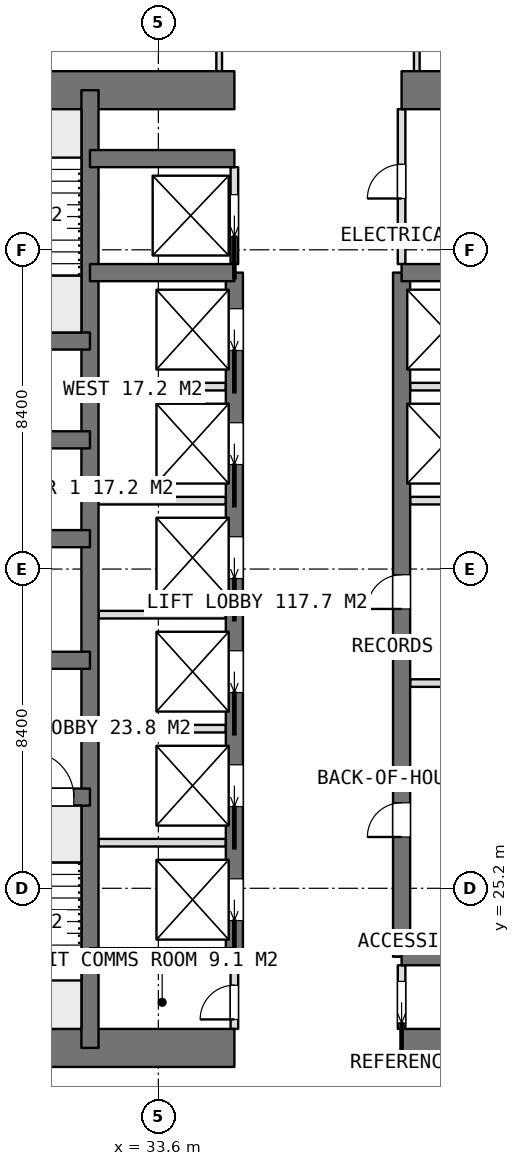
"""IFC4 building model, lengths in metres.
Left out: names, types, materials, properties, quantities, classifications, styles, units other than length and angle.
Written with IfcOpenShell. Run it as: python <this file> out.ifc"""

import sys

from ifc_helpers import new_model, si_unit, direction, frame, frame_2d, origin, place, context, subcontext, project, spatial, rectangle, extrude, element, fill, save


model = new_model("IFC4")
c1 = context("Model", 3, precision=1e-05, world=origin(), true_north=direction((0.0, 1.0)))
c2 = subcontext(c1, "Body", "Model", "MODEL_VIEW")
j1 = project(units=[si_unit("LENGTHUNIT", "METRE"), si_unit("PLANEANGLEUNIT", "RADIAN")], contexts=[c1])
p1 = place(None, origin())
s1 = spatial("IfcSite", under=j1, at=p1, CompositionType="ELEMENT")
p2 = place(p1, origin())
s2 = spatial("IfcBuilding", under=s1, at=p2, CompositionType="ELEMENT")
p3 = place(p2, frame((0.0, 0.0, 206.45)))
s3 = spatial("IfcBuildingStorey", under=s2, at=p3, CompositionType="ELEMENT", Elevation=206.45)
p4 = place(p3, frame((25.2, 21.0, 0.0), z_axis=(0.0, 0.0, 1.0), x_axis=(1.0, 0.0, 0.0)))
e1 = element("IfcWall", 1, at=p4, inside=s3, PredefinedType="SHEAR", context=c2, shape_type="SweptSolid", body=[
    extrude(rectangle(XDim=10.4, YDim=1.0, at=frame_2d((5.2, 0.0))), origin(), (0.0, 0.0, 1.0), 3.75),
])
p5 = place(p3, frame((40.0, 21.0, 0.0), z_axis=(0.0, 0.0, 1.0), x_axis=(1.0, 0.0, 0.0)))
e2 = element("IfcWall", 2, at=p5, inside=s3, PredefinedType="SHEAR", context=c2, shape_type="SweptSolid", body=[
    extrude(rectangle(XDim=10.4, YDim=1.0, at=frame_2d((5.2, 0.0))), origin(), (0.0, 0.0, 1.0), 3.75),
])
p6 = place(p3, frame((25.2, 46.2, 0.0), z_axis=(0.0, 0.0, 1.0), x_axis=(1.0, 0.0, 0.0)))
e3 = element("IfcWall", 3, at=p6, inside=s3, PredefinedType="SHEAR", context=c2, shape_type="SweptSolid", body=[
    extrude(rectangle(XDim=10.4, YDim=1.0, at=frame_2d((5.2, 0.0))), origin(), (0.0, 0.0, 1.0), 3.75),
])
p7 = place(p3, frame((40.0, 46.2, 0.0), z_axis=(0.0, 0.0, 1.0), x_axis=(1.0, 0.0, 0.0)))
e4 = element("IfcWall", 4, at=p7, inside=s3, PredefinedType="SHEAR", context=c2, shape_type="SweptSolid", body=[
    extrude(rectangle(XDim=10.4, YDim=1.0, at=frame_2d((5.2, 0.0))), origin(), (0.0, 0.0, 1.0), 3.75),
])
p8 = place(p3, frame((31.8, 21.0, 0.0), z_axis=(0.0, 0.0, 1.0), x_axis=(0.0, 1.0, 0.0)))
e5 = element("IfcWall", 5, at=p8, inside=s3, PredefinedType="SHEAR", context=c2, shape_type="SweptSolid", body=[
    extrude(rectangle(XDim=25.2, YDim=0.45, at=frame_2d((12.6, 0.0))), origin(), (0.0, 0.0, 1.0), 3.75),
])
p9 = place(p3, frame((35.6, 23.4, 0.0), z_axis=(0.0, 0.0, 1.0), x_axis=(0.0, 1.0, 0.0)))
e6 = element("IfcWall", 6, at=p9, inside=s3, PredefinedType="SHEAR", context=c2, shape_type="SweptSolid", body=[
    extrude(rectangle(XDim=18.0, YDim=0.45, at=frame_2d((9.0, 0.0))), origin(), (0.0, 0.0, 1.0), 3.75),
])
p10 = place(p9, frame((0.95, 0.0, 0.0)))
e7 = element("IfcOpeningElement", 7, at=p10, cuts=e6, PredefinedType="OPENING", context=c2, shape_type="SweptSolid", body=[
    extrude(rectangle(XDim=1.1, YDim=2.1, at=frame_2d((0.55, 1.05))), frame((0.0, 0.235, 0.0), z_axis=(0.0, -1.0, 0.0), x_axis=(1.0, 0.0, 0.0)), (0.0, 0.0, 1.0), 0.47),
])
p11 = place(p9, frame((3.95, 0.0, 0.0)))
e8 = element("IfcOpeningElement", 8, at=p11, cuts=e6, PredefinedType="OPENING", context=c2, shape_type="SweptSolid", body=[
    extrude(rectangle(XDim=1.1, YDim=2.1, at=frame_2d((0.55, 1.05))), frame((0.0, 0.235, 0.0), z_axis=(0.0, -1.0, 0.0), x_axis=(1.0, 0.0, 0.0)), (0.0, 0.0, 1.0), 0.47),
])
p12 = place(p9, frame((6.95, 0.0, 0.0)))
e9 = element("IfcOpeningElement", 9, at=p12, cuts=e6, PredefinedType="OPENING", context=c2, shape_type="SweptSolid", body=[
    extrude(rectangle(XDim=1.1, YDim=2.1, at=frame_2d((0.55, 1.05))), frame((0.0, 0.235, 0.0), z_axis=(0.0, -1.0, 0.0), x_axis=(1.0, 0.0, 0.0)), (0.0, 0.0, 1.0), 0.47),
])
p13 = place(p9, frame((9.95, 0.0, 0.0)))
e10 = element("IfcOpeningElement", 10, at=p13, cuts=e6, PredefinedType="OPENING", context=c2, shape_type="SweptSolid", body=[
    extrude(rectangle(XDim=1.1, YDim=2.1, at=frame_2d((0.55, 1.05))), frame((0.0, 0.235, 0.0), z_axis=(0.0, -1.0, 0.0), x_axis=(1.0, 0.0, 0.0)), (0.0, 0.0, 1.0), 0.47),
])
p14 = place(p9, frame((12.95, 0.0, 0.0)))
e11 = element("IfcOpeningElement", 11, at=p14, cuts=e6, PredefinedType="OPENING", context=c2, shape_type="SweptSolid", body=[
    extrude(rectangle(XDim=1.1, YDim=2.1, at=frame_2d((0.55, 1.05))), frame((0.0, 0.235, 0.0), z_axis=(0.0, -1.0, 0.0), x_axis=(1.0, 0.0, 0.0)), (0.0, 0.0, 1.0), 0.47),
])
p15 = place(p9, frame((15.95, 0.0, 0.0)))
e12 = element("IfcOpeningElement", 12, at=p15, cuts=e6, PredefinedType="OPENING", context=c2, shape_type="SweptSolid", body=[
    extrude(rectangle(XDim=1.1, YDim=2.1, at=frame_2d((0.55, 1.05))), frame((0.0, 0.235, 0.0), z_axis=(0.0, -1.0, 0.0), x_axis=(1.0, 0.0, 0.0)), (0.0, 0.0, 1.0), 0.47),
])
p16 = place(p3, frame((40.0, 23.4, 0.0), z_axis=(0.0, 0.0, 1.0), x_axis=(0.0, 1.0, 0.0)))
e13 = element("IfcWall", 13, at=p16, inside=s3, PredefinedType="SHEAR", context=c2, shape_type="SweptSolid", body=[
    extrude(rectangle(XDim=18.0, YDim=0.45, at=frame_2d((9.0, 0.0))), origin(), (0.0, 0.0, 1.0), 3.75),
])
p17 = place(p16, frame((3.15, 0.0, 0.0)))
e14 = element("IfcOpeningElement", 14, at=p17, cuts=e13, PredefinedType="OPENING", context=c2, shape_type="SweptSolid", body=[
    extrude(rectangle(XDim=0.9, YDim=2.1, at=frame_2d((0.45, 1.05))), frame((0.0, 0.235, 0.0), z_axis=(0.0, -1.0, 0.0), x_axis=(1.0, 0.0, 0.0)), (0.0, 0.0, 1.0), 0.47),
])
p18 = place(p16, frame((9.15, 0.0, 0.0)))
e15 = element("IfcOpeningElement", 15, at=p18, cuts=e13, PredefinedType="OPENING", context=c2, shape_type="SweptSolid", body=[
    extrude(rectangle(XDim=0.9, YDim=2.1, at=frame_2d((0.45, 1.05))), frame((0.0, 0.235, 0.0), z_axis=(0.0, -1.0, 0.0), x_axis=(1.0, 0.0, 0.0)), (0.0, 0.0, 1.0), 0.47),
])
for number, where, z_axis, x_axis in (
    (16, (31.8, 23.4, 0.0), (0.0, 0.0, 1.0), (1.0, 0.0, 0.0)),
    (17, (31.8, 41.4, 0.0), (0.0, 0.0, 1.0), (1.0, 0.0, 0.0)),
    (18, (31.8, 44.4, 0.0), (0.0, 0.0, 1.0), (1.0, 0.0, 0.0)),
    (19, (40.0, 23.4, 0.0), (0.0, 0.0, 1.0), (1.0, 0.0, 0.0)),
    (20, (40.0, 41.4, 0.0), (0.0, 0.0, 1.0), (1.0, 0.0, 0.0)),
):
    element("IfcWall", number, at=place(p3, frame(where, z_axis=z_axis, x_axis=x_axis)), inside=s3, PredefinedType="SHEAR", context=c2, shape_type="SweptSolid", body=[
        extrude(rectangle(XDim=3.8, YDim=0.45, at=frame_2d((1.9, 0.0))), origin(), (0.0, 0.0, 1.0), 3.75),
    ])
p19 = place(p3, frame((25.2, 27.6, 0.0), z_axis=(0.0, 0.0, 1.0), x_axis=(1.0, 0.0, 0.0)))
e21 = element("IfcWall", 21, at=p19, inside=s3, PredefinedType="SHEAR", context=c2, shape_type="SweptSolid", body=[
    extrude(rectangle(XDim=6.6, YDim=0.45, at=frame_2d((3.3, 0.0))), origin(), (0.0, 0.0, 1.0), 3.75),
])
p20 = place(p19, frame((4.975, 0.0, 0.0)))
e22 = element("IfcOpeningElement", 22, at=p20, cuts=e21, PredefinedType="OPENING", context=c2, shape_type="SweptSolid", body=[
    extrude(rectangle(XDim=1.2, YDim=2.1, at=frame_2d((0.6, 1.05))), frame((0.0, 0.235, 0.0), z_axis=(0.0, -1.0, 0.0), x_axis=(1.0, 0.0, 0.0)), (0.0, 0.0, 1.0), 0.47),
])
p21 = place(p3, frame((25.2, 31.2, 0.0), z_axis=(0.0, 0.0, 1.0), x_axis=(1.0, 0.0, 0.0)))
e23 = element("IfcWall", 23, at=p21, inside=s3, PredefinedType="SHEAR", context=c2, shape_type="SweptSolid", body=[
    extrude(rectangle(XDim=6.6, YDim=0.45, at=frame_2d((3.3, 0.0))), origin(), (0.0, 0.0, 1.0), 3.75),
])
p22 = place(p21, frame((2.65, 0.0, 0.0)))
e24 = element("IfcOpeningElement", 24, at=p22, cuts=e23, PredefinedType="OPENING", context=c2, shape_type="SweptSolid", body=[
    extrude(rectangle(XDim=1.3, YDim=2.1, at=frame_2d((0.65, 1.05))), frame((0.0, 0.235, 0.0), z_axis=(0.0, -1.0, 0.0), x_axis=(1.0, 0.0, 0.0)), (0.0, 0.0, 1.0), 0.47),
])
for number, where, z_axis, x_axis in (
    (25, (25.2, 34.4, 0.0), (0.0, 0.0, 1.0), (1.0, 0.0, 0.0)),
    (26, (25.2, 37.0, 0.0), (0.0, 0.0, 1.0), (1.0, 0.0, 0.0)),
    (27, (25.2, 39.6, 0.0), (0.0, 0.0, 1.0), (1.0, 0.0, 0.0)),
):
    element("IfcWall", number, at=place(p3, frame(where, z_axis=z_axis, x_axis=x_axis)), inside=s3, PredefinedType="SHEAR", context=c2, shape_type="SweptSolid", body=[
        extrude(rectangle(XDim=6.6, YDim=0.45, at=frame_2d((3.3, 0.0))), origin(), (0.0, 0.0, 1.0), 3.75),
    ])
for number, where, z_axis, x_axis in (
    (28, (32.025, 26.4, 0.0), (0.0, 0.0, 1.0), (1.0, 0.0, 0.0)),
    (29, (32.025, 29.4, 0.0), (0.0, 0.0, 1.0), (1.0, 0.0, 0.0)),
    (30, (32.025, 32.4, 0.0), (0.0, 0.0, 1.0), (1.0, 0.0, 0.0)),
    (31, (32.025, 35.4, 0.0), (0.0, 0.0, 1.0), (1.0, 0.0, 0.0)),
    (32, (32.025, 38.4, 0.0), (0.0, 0.0, 1.0), (1.0, 0.0, 0.0)),
):
    element("IfcWall", number, at=place(p3, frame(where, z_axis=z_axis, x_axis=x_axis)), inside=s3, PredefinedType="PARTITIONING", context=c2, shape_type="SweptSolid", body=[
        extrude(rectangle(XDim=3.35, YDim=0.2, at=frame_2d((1.675, 0.0))), origin(), (0.0, 0.0, 1.0), 3.5),
    ])
for number, where, z_axis, x_axis in (
    (33, (40.225, 35.4, 0.0), (0.0, 0.0, 1.0), (1.0, 0.0, 0.0)),
    (34, (40.225, 38.4, 0.0), (0.0, 0.0, 1.0), (1.0, 0.0, 0.0)),
):
    element("IfcWall", number, at=place(p3, frame(where, z_axis=z_axis, x_axis=x_axis)), inside=s3, PredefinedType="PARTITIONING", context=c2, shape_type="SweptSolid", body=[
        extrude(rectangle(XDim=3.35, YDim=0.2, at=frame_2d((1.675, 0.0))), origin(), (0.0, 0.0, 1.0), 3.5),
    ])
p23 = place(p3, frame((40.0, 21.5, 0.0), z_axis=(0.0, 0.0, 1.0), x_axis=(0.0, 1.0, 0.0)))
e35 = element("IfcWall", 35, at=p23, inside=s3, PredefinedType="PARTITIONING", context=c2, shape_type="SweptSolid", body=[
    extrude(rectangle(XDim=1.675, YDim=0.2, at=frame_2d((0.837, 0.0))), origin(), (0.0, 0.0, 1.0), 3.5),
])
p24 = place(p23, frame((0.15, 0.0, 0.0)))
e36 = element("IfcOpeningElement", 36, at=p24, cuts=e35, PredefinedType="OPENING", context=c2, shape_type="SweptSolid", body=[
    extrude(rectangle(XDim=1.1, YDim=2.1, at=frame_2d((0.55, 1.05))), frame((0.0, 0.11, 0.0), z_axis=(0.0, -1.0, 0.0), x_axis=(1.0, 0.0, 0.0)), (0.0, 0.0, 1.0), 0.22),
])
p25 = place(p3, frame((40.0, 41.625, 0.0), z_axis=(0.0, 0.0, 1.0), x_axis=(0.0, 1.0, 0.0)))
e37 = element("IfcWall", 37, at=p25, inside=s3, PredefinedType="PARTITIONING", context=c2, shape_type="SweptSolid", body=[
    extrude(rectangle(XDim=4.075, YDim=0.2, at=frame_2d((2.038, 0.0))), origin(), (0.0, 0.0, 1.0), 3.5),
])
p26 = place(p25, frame((1.725, 0.0, 0.0)))
e38 = element("IfcOpeningElement", 38, at=p26, cuts=e37, PredefinedType="OPENING", context=c2, shape_type="SweptSolid", body=[
    extrude(rectangle(XDim=0.9, YDim=2.1, at=frame_2d((0.45, 1.05))), frame((0.0, 0.11, 0.0), z_axis=(0.0, -1.0, 0.0), x_axis=(1.0, 0.0, 0.0)), (0.0, 0.0, 1.0), 0.22),
])
p27 = place(p3, frame((35.6, 41.625, 0.0), z_axis=(0.0, 0.0, 1.0), x_axis=(0.0, 1.0, 0.0)))
e39 = element("IfcWall", 39, at=p27, inside=s3, PredefinedType="PARTITIONING", context=c2, shape_type="SweptSolid", body=[
    extrude(rectangle(XDim=2.55, YDim=0.2, at=frame_2d((1.275, 0.0))), origin(), (0.0, 0.0, 1.0), 3.5),
])
p28 = place(p27, frame((0.725, 0.0, 0.0)))
e40 = element("IfcOpeningElement", 40, at=p28, cuts=e39, PredefinedType="OPENING", context=c2, shape_type="SweptSolid", body=[
    extrude(rectangle(XDim=1.1, YDim=2.1, at=frame_2d((0.55, 1.05))), frame((0.0, 0.11, 0.0), z_axis=(0.0, -1.0, 0.0), x_axis=(1.0, 0.0, 0.0)), (0.0, 0.0, 1.0), 0.22),
])
p29 = place(p3, frame((35.6, 21.5, 0.0), z_axis=(0.0, 0.0, 1.0), x_axis=(0.0, 1.0, 0.0)))
e41 = element("IfcWall", 41, at=p29, inside=s3, PredefinedType="PARTITIONING", context=c2, shape_type="SweptSolid", body=[
    extrude(rectangle(XDim=1.675, YDim=0.2, at=frame_2d((0.837, 0.0))), origin(), (0.0, 0.0, 1.0), 3.5),
])
p30 = place(p29, frame((0.25, 0.0, 0.0)))
e42 = element("IfcOpeningElement", 42, at=p30, cuts=e41, PredefinedType="OPENING", context=c2, shape_type="SweptSolid", body=[
    extrude(rectangle(XDim=0.9, YDim=2.1, at=frame_2d((0.45, 1.05))), frame((0.0, 0.11, 0.0), z_axis=(0.0, -1.0, 0.0), x_axis=(1.0, 0.0, 0.0)), (0.0, 0.0, 1.0), 0.22),
])
p31 = place(p3, frame((40.225, 30.6, 0.0), z_axis=(0.0, 0.0, 1.0), x_axis=(1.0, 0.0, 0.0)))
e43 = element("IfcWall", 43, at=p31, inside=s3, PredefinedType="PARTITIONING", context=c2, shape_type="SweptSolid", body=[
    extrude(rectangle(XDim=3.35, YDim=0.2, at=frame_2d((1.675, 0.0))), origin(), (0.0, 0.0, 1.0), 3.5),
])
for number, where, z_axis, x_axis in (
    (44, (40.4, 46.7, 0.0), (0.0, 0.0, 1.0), (0.0, 1.0, 0.0)),
    (45, (35.2, 46.7, 0.0), (0.0, 0.0, 1.0), (0.0, 1.0, 0.0)),
):
    element("IfcWall", number, at=place(p3, frame(where, z_axis=z_axis, x_axis=x_axis)), inside=s3, PredefinedType="PARTITIONING", context=c2, shape_type="SweptSolid", body=[
        extrude(rectangle(XDim=2.625, YDim=0.15, at=frame_2d((1.312, 0.0))), origin(), (0.0, 0.0, 1.0), 3.5),
    ])
p32 = place(p24, origin())
e46 = element("IfcDoor", 46, at=p32, inside=s3, OperationType="SLIDING_TO_LEFT", PredefinedType="DOOR", context=c2, shape_type="SweptSolid", body=[
    extrude(rectangle(XDim=1.1, YDim=2.1, at=frame_2d((0.55, 1.05))), frame((0.0, 0.025, 0.0), z_axis=(0.0, -1.0, 0.0), x_axis=(1.0, 0.0, 0.0)), (0.0, 0.0, 1.0), 0.05),
])
fill(e36, e46)
p33 = place(p30, origin())
e47 = element("IfcDoor", 47, at=p33, inside=s3, OperationType="SINGLE_SWING_LEFT", PredefinedType="DOOR", context=c2, shape_type="SweptSolid", body=[
    extrude(rectangle(XDim=0.9, YDim=2.1, at=frame_2d((0.45, 1.05))), frame((0.0, 0.025, 0.0), z_axis=(0.0, -1.0, 0.0), x_axis=(1.0, 0.0, 0.0)), (0.0, 0.0, 1.0), 0.05),
])
fill(e42, e47)
p34 = place(p26, origin())
e48 = element("IfcDoor", 48, at=p34, inside=s3, OperationType="SINGLE_SWING_LEFT", PredefinedType="DOOR", context=c2, shape_type="SweptSolid", body=[
    extrude(rectangle(XDim=0.9, YDim=2.1, at=frame_2d((0.45, 1.05))), frame((0.0, 0.025, 0.0), z_axis=(0.0, -1.0, 0.0), x_axis=(1.0, 0.0, 0.0)), (0.0, 0.0, 1.0), 0.05),
])
fill(e38, e48)
p35 = place(p17, origin())
e49 = element("IfcDoor", 49, at=p35, inside=s3, OperationType="SINGLE_SWING_LEFT", PredefinedType="DOOR", context=c2, shape_type="SweptSolid", body=[
    extrude(rectangle(XDim=0.9, YDim=2.1, at=frame_2d((0.45, 1.05))), frame((0.0, 0.025, 0.0), z_axis=(0.0, -1.0, 0.0), x_axis=(1.0, 0.0, 0.0)), (0.0, 0.0, 1.0), 0.05),
])
fill(e14, e49)
p36 = place(p18, origin())
e50 = element("IfcDoor", 50, at=p36, inside=s3, OperationType="SINGLE_SWING_LEFT", PredefinedType="DOOR", context=c2, shape_type="SweptSolid", body=[
    extrude(rectangle(XDim=0.9, YDim=2.1, at=frame_2d((0.45, 1.05))), frame((0.0, 0.025, 0.0), z_axis=(0.0, -1.0, 0.0), x_axis=(1.0, 0.0, 0.0)), (0.0, 0.0, 1.0), 0.05),
])
fill(e15, e50)
p37 = place(p10, origin())
e51 = element("IfcDoor", 51, at=p37, inside=s3, OperationType="SLIDING_TO_LEFT", PredefinedType="USERDEFINED", context=c2, shape_type="SweptSolid", body=[
    extrude(rectangle(XDim=1.1, YDim=2.1, at=frame_2d((0.55, 1.05))), frame((0.0, 0.025, 0.0), z_axis=(0.0, -1.0, 0.0), x_axis=(1.0, 0.0, 0.0)), (0.0, 0.0, 1.0), 0.05),
])
fill(e7, e51)
p38 = place(p11, origin())
e52 = element("IfcDoor", 52, at=p38, inside=s3, OperationType="SLIDING_TO_LEFT", PredefinedType="USERDEFINED", context=c2, shape_type="SweptSolid", body=[
    extrude(rectangle(XDim=1.1, YDim=2.1, at=frame_2d((0.55, 1.05))), frame((0.0, 0.025, 0.0), z_axis=(0.0, -1.0, 0.0), x_axis=(1.0, 0.0, 0.0)), (0.0, 0.0, 1.0), 0.05),
])
fill(e8, e52)
p39 = place(p12, origin())
e53 = element("IfcDoor", 53, at=p39, inside=s3, OperationType="SLIDING_TO_LEFT", PredefinedType="USERDEFINED", context=c2, shape_type="SweptSolid", body=[
    extrude(rectangle(XDim=1.1, YDim=2.1, at=frame_2d((0.55, 1.05))), frame((0.0, 0.025, 0.0), z_axis=(0.0, -1.0, 0.0), x_axis=(1.0, 0.0, 0.0)), (0.0, 0.0, 1.0), 0.05),
])
fill(e9, e53)
p40 = place(p13, origin())
e54 = element("IfcDoor", 54, at=p40, inside=s3, OperationType="SLIDING_TO_LEFT", PredefinedType="USERDEFINED", context=c2, shape_type="SweptSolid", body=[
    extrude(rectangle(XDim=1.1, YDim=2.1, at=frame_2d((0.55, 1.05))), frame((0.0, 0.025, 0.0), z_axis=(0.0, -1.0, 0.0), x_axis=(1.0, 0.0, 0.0)), (0.0, 0.0, 1.0), 0.05),
])
fill(e10, e54)
p41 = place(p14, origin())
e55 = element("IfcDoor", 55, at=p41, inside=s3, OperationType="SLIDING_TO_LEFT", PredefinedType="USERDEFINED", context=c2, shape_type="SweptSolid", body=[
    extrude(rectangle(XDim=1.1, YDim=2.1, at=frame_2d((0.55, 1.05))), frame((0.0, 0.025, 0.0), z_axis=(0.0, -1.0, 0.0), x_axis=(1.0, 0.0, 0.0)), (0.0, 0.0, 1.0), 0.05),
])
fill(e11, e55)
p42 = place(p15, origin())
e56 = element("IfcDoor", 56, at=p42, inside=s3, OperationType="SLIDING_TO_LEFT", PredefinedType="USERDEFINED", context=c2, shape_type="SweptSolid", body=[
    extrude(rectangle(XDim=1.1, YDim=2.1, at=frame_2d((0.55, 1.05))), frame((0.0, 0.025, 0.0), z_axis=(0.0, -1.0, 0.0), x_axis=(1.0, 0.0, 0.0)), (0.0, 0.0, 1.0), 0.05),
])
fill(e12, e56)
p43 = place(p28, origin())
e57 = element("IfcDoor", 57, at=p43, inside=s3, OperationType="SLIDING_TO_LEFT", PredefinedType="USERDEFINED", context=c2, shape_type="SweptSolid", body=[
    extrude(rectangle(XDim=1.1, YDim=2.1, at=frame_2d((0.55, 1.05))), frame((0.0, 0.025, 0.0), z_axis=(0.0, -1.0, 0.0), x_axis=(1.0, 0.0, 0.0)), (0.0, 0.0, 1.0), 0.05),
])
fill(e40, e57)
p44 = place(p20, origin())
e58 = element("IfcDoor", 58, at=p44, inside=s3, OperationType="SINGLE_SWING_RIGHT", PredefinedType="DOOR", context=c2, shape_type="SweptSolid", body=[
    extrude(rectangle(XDim=1.2, YDim=2.1, at=frame_2d((0.6, 1.05))), frame((0.0, 0.025, 0.0), z_axis=(0.0, -1.0, 0.0), x_axis=(1.0, 0.0, 0.0)), (0.0, 0.0, 1.0), 0.05),
])
fill(e22, e58)
save(model, sys.argv[1])
